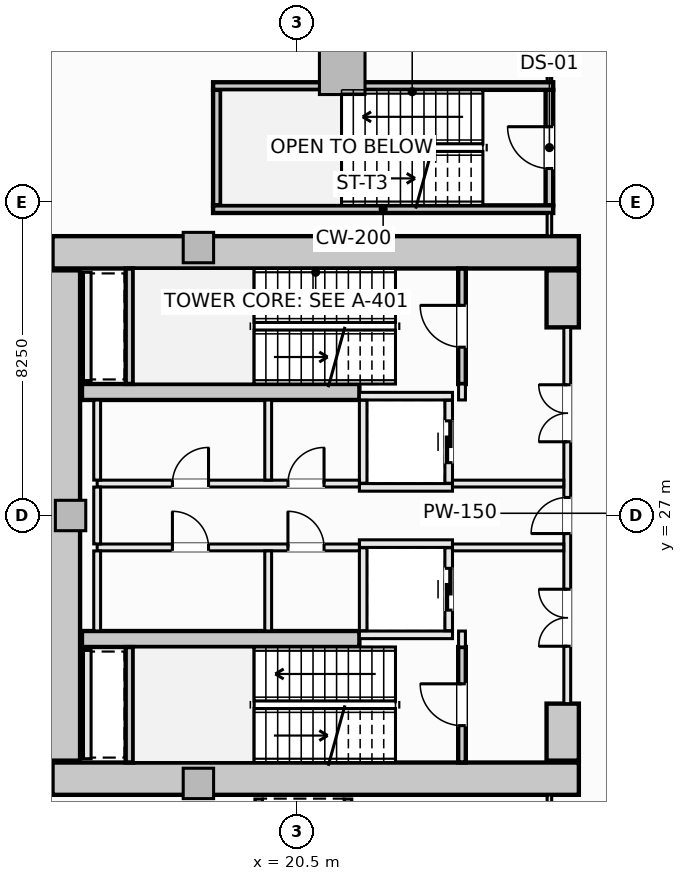
"""IFC4 building model, lengths in metres.
Left out: names, types, materials, properties, quantities, classifications, styles, units other than length and angle.
Written with IfcOpenShell. Run it as: python <this file> out.ifc"""

import sys

from ifc_helpers import new_model, si_unit, direction, frame, frame_2d, origin, origin_2d, place, context, subcontext, project, spatial, rectangle, extrude, element, fill, save


model = new_model("IFC4")
c1 = context("Model", 3, precision=1e-05, world=origin(), true_north=direction((0.0, 1.0)))
c2 = subcontext(c1, "Body", "Model", "MODEL_VIEW")
j1 = project(units=[si_unit("LENGTHUNIT", "METRE"), si_unit("PLANEANGLEUNIT", "RADIAN")], contexts=[c1])
p1 = place(None, origin())
s1 = spatial("IfcSite", under=j1, at=p1, CompositionType="ELEMENT")
p2 = place(p1, origin())
s2 = spatial("IfcBuilding", under=s1, at=p2, CompositionType="ELEMENT")
p3 = place(p2, frame((0.0, 0.0, -9.0)))
s3 = spatial("IfcBuildingStorey", under=s2, at=p3, CompositionType="ELEMENT", Elevation=-9.0)
for number, where, z_axis, x_axis in (
    (1, (14.075, 33.925, -0.32), (0.0, 0.0, 1.0), (1.0, 0.0, 0.0)),
    (2, (14.075, 20.075, -0.32), (0.0, 0.0, 1.0), (1.0, 0.0, 0.0)),
):
    element("IfcWall", number, at=place(p3, frame(where, z_axis=z_axis, x_axis=x_axis)), inside=s3, PredefinedType="SHEAR", context=c2, shape_type="SweptSolid", body=[
        extrude(rectangle(XDim=13.85, YDim=0.85, at=frame_2d((6.925, 0.0))), origin(), (0.0, 0.0, 1.0), 4.5),
    ])
p4 = place(p3, frame((14.375, 20.55, -0.32), z_axis=(0.0, 0.0, 1.0), x_axis=(0.0, 1.0, 0.0)))
e3 = element("IfcWall", 3, at=p4, inside=s3, PredefinedType="SHEAR", context=c2, shape_type="SweptSolid", body=[
    extrude(rectangle(XDim=12.9, YDim=0.85, at=frame_2d((6.45, 0.0))), origin(), (0.0, 0.0, 1.0), 4.5),
])
for number, where, z_axis, x_axis in (
    (4, (27.5, 31.95, -0.32), (0.0, 0.0, 1.0), (0.0, 1.0, 0.0)),
    (5, (27.5, 20.55, -0.32), (0.0, 0.0, 1.0), (0.0, 1.0, 0.0)),
):
    element("IfcWall", number, at=place(p3, frame(where, z_axis=z_axis, x_axis=x_axis)), inside=s3, PredefinedType="SHEAR", context=c2, shape_type="SweptSolid", body=[
        extrude(rectangle(XDim=1.5, YDim=0.85, at=frame_2d((0.75, 0.0))), origin(), (0.0, 0.0, 1.0), 4.5),
    ])
for number, where, z_axis, x_axis in (
    (6, (14.85, 30.25, -0.32), (0.0, 0.0, 1.0), (1.0, 0.0, 0.0)),
    (7, (14.85, 23.75, -0.32), (0.0, 0.0, 1.0), (1.0, 0.0, 0.0)),
):
    element("IfcWall", number, at=place(p3, frame(where, z_axis=z_axis, x_axis=x_axis)), inside=s3, PredefinedType="SHEAR", context=c2, shape_type="SweptSolid", body=[
        extrude(rectangle(XDim=7.3, YDim=0.42, at=frame_2d((3.65, 0.0))), origin(), (0.0, 0.0, 1.0), 4.5),
    ])
p5 = place(p3, frame((21.698, 38.677, -0.32), z_axis=(0.0, 0.0, 1.0), x_axis=(1.0, 0.0, 0.0)))
e8 = element("IfcColumn", 8, at=p5, inside=s3, PredefinedType="COLUMN", context=c2, shape_type="SweptSolid", body=[
    extrude(rectangle(XDim=1.2, YDim=1.2, at=origin_2d()), origin(), (0.0, 0.0, 1.0), 4.5),
])
for number, where, z_axis, x_axis in (
    (9, (17.914, 34.05, -0.32), (0.0, 0.0, 1.0), (1.0, 0.0, 0.0)),
    (10, (14.55, 27.0, -0.32), (0.0, 0.0, 1.0), (1.0, 0.0, 0.0)),
    (11, (17.914, 19.95, -0.32), (0.0, 0.0, 1.0), (1.0, 0.0, 0.0)),
):
    element("IfcColumn", number, at=place(p3, frame(where, z_axis=z_axis, x_axis=x_axis)), inside=s3, PredefinedType="PILASTER", context=c2, shape_type="SweptSolid", body=[
        extrude(rectangle(XDim=0.8, YDim=0.8, at=origin_2d()), origin(), (0.0, 0.0, 1.0), 4.5),
    ])
p6 = place(p3, frame((24.85, 30.46, -0.32), z_axis=(0.0, 0.0, 1.0), x_axis=(0.0, 1.0, 0.0)))
e12 = element("IfcWall", 12, at=p6, inside=s3, PredefinedType="SHEAR", context=c2, shape_type="SweptSolid", body=[
    extrude(rectangle(XDim=3.038, YDim=0.2, at=frame_2d((1.519, 0.0))), origin(), (0.0, 0.0, 1.0), 4.5),
])
p7 = place(p6, frame((0.969, 0.0, 0.32)))
e13 = element("IfcOpeningElement", 13, at=p7, cuts=e12, PredefinedType="OPENING", context=c2, shape_type="SweptSolid", body=[
    extrude(rectangle(XDim=1.1, YDim=2.15, at=frame_2d((0.55, 1.075))), frame((0.0, 0.11, 0.0), z_axis=(0.0, -1.0, 0.0), x_axis=(1.0, 0.0, 0.0)), (0.0, 0.0, 1.0), 0.22),
])
p8 = place(p3, frame((16.1, 30.462, -0.32), z_axis=(0.0, 0.0, 1.0), x_axis=(0.0, 1.0, 0.0)))
e14 = element("IfcWall", 14, at=p8, inside=s3, PredefinedType="SHEAR", context=c2, shape_type="SweptSolid", body=[
    extrude(rectangle(XDim=3.036, YDim=0.2, at=frame_2d((1.518, 0.0))), origin(), (0.0, 0.0, 1.0), 4.5),
])
p9 = place(p3, frame((24.85, 20.502, -0.32), z_axis=(0.0, 0.0, 1.0), x_axis=(0.0, 1.0, 0.0)))
e15 = element("IfcWall", 15, at=p9, inside=s3, PredefinedType="SHEAR", context=c2, shape_type="SweptSolid", body=[
    extrude(rectangle(XDim=3.038, YDim=0.2, at=frame_2d((1.519, 0.0))), origin(), (0.0, 0.0, 1.0), 4.5),
])
p10 = place(p9, frame((0.969, 0.0, 0.32)))
e16 = element("IfcOpeningElement", 16, at=p10, cuts=e15, PredefinedType="OPENING", context=c2, shape_type="SweptSolid", body=[
    extrude(rectangle(XDim=1.1, YDim=2.15, at=frame_2d((0.55, 1.075))), frame((0.0, 0.11, 0.0), z_axis=(0.0, -1.0, 0.0), x_axis=(1.0, 0.0, 0.0)), (0.0, 0.0, 1.0), 0.22),
])
p11 = place(p3, frame((16.1, 20.502, -0.32), z_axis=(0.0, 0.0, 1.0), x_axis=(0.0, 1.0, 0.0)))
e17 = element("IfcWall", 17, at=p11, inside=s3, PredefinedType="SHEAR", context=c2, shape_type="SweptSolid", body=[
    extrude(rectangle(XDim=3.036, YDim=0.2, at=frame_2d((1.518, 0.0))), origin(), (0.0, 0.0, 1.0), 4.5),
])
p12 = place(p3, frame((27.15, 35.16, -0.32), z_axis=(0.0, 0.0, 1.0), x_axis=(0.0, 1.0, 0.0)))
e18 = element("IfcWall", 18, at=p12, inside=s3, PredefinedType="SHEAR", context=c2, shape_type="SweptSolid", body=[
    extrude(rectangle(XDim=3.04, YDim=0.2, at=frame_2d((1.52, 0.0))), origin(), (0.0, 0.0, 1.0), 4.5),
])
p13 = place(p12, frame((0.97, 0.0, 0.32)))
e19 = element("IfcOpeningElement", 19, at=p13, cuts=e18, PredefinedType="OPENING", context=c2, shape_type="SweptSolid", body=[
    extrude(rectangle(XDim=1.1, YDim=2.15, at=frame_2d((0.55, 1.075))), frame((0.0, 0.11, 0.0), z_axis=(0.0, -1.0, 0.0), x_axis=(1.0, 0.0, 0.0)), (0.0, 0.0, 1.0), 0.22),
])
p14 = place(p3, frame((18.4, 35.16, -0.32), z_axis=(0.0, 0.0, 1.0), x_axis=(0.0, 1.0, 0.0)))
e20 = element("IfcWall", 20, at=p14, inside=s3, PredefinedType="SHEAR", context=c2, shape_type="SweptSolid", body=[
    extrude(rectangle(XDim=3.04, YDim=0.2, at=frame_2d((1.52, 0.0))), origin(), (0.0, 0.0, 1.0), 4.5),
])
for number, where, z_axis, x_axis in (
    (21, (18.3, 38.3, -0.32), (0.0, 0.0, 1.0), (1.0, 0.0, 0.0)),
    (22, (18.3, 35.06, -0.32), (0.0, 0.0, 1.0), (1.0, 0.0, 0.0)),
):
    element("IfcWall", number, at=place(p3, frame(where, z_axis=z_axis, x_axis=x_axis)), inside=s3, PredefinedType="SHEAR", context=c2, shape_type="SweptSolid", body=[
        extrude(rectangle(XDim=8.95, YDim=0.2, at=frame_2d((4.475, 0.0))), origin(), (0.0, 0.0, 1.0), 4.5),
    ])
for number, where, z_axis, x_axis in (
    (23, (22.15, 30.14, 0.0), (0.0, 0.0, 1.0), (1.0, 0.0, 0.0)),
    (24, (22.15, 27.74, 0.0), (0.0, 0.0, 1.0), (1.0, 0.0, 0.0)),
):
    element("IfcWall", number, at=place(p3, frame(where, z_axis=z_axis, x_axis=x_axis)), inside=s3, PredefinedType="SOLIDWALL", context=c2, shape_type="SweptSolid", body=[
        extrude(rectangle(XDim=2.45, YDim=0.2, at=frame_2d((1.225, 0.0))), origin(), (0.0, 0.0, 1.0), 4.18),
    ])
p15 = place(p3, frame((22.25, 27.85, 0.0), z_axis=(0.0, 0.0, 1.0), x_axis=(0.0, 1.0, 0.0)))
e25 = element("IfcWall", 25, at=p15, inside=s3, PredefinedType="SOLIDWALL", context=c2, shape_type="SweptSolid", body=[
    extrude(rectangle(XDim=2.18, YDim=0.2, at=frame_2d((1.09, 0.0))), origin(), (0.0, 0.0, 1.0), 4.18),
])
p16 = place(p3, frame((24.5, 27.85, 0.0), z_axis=(0.0, 0.0, 1.0), x_axis=(0.0, 1.0, 0.0)))
e26 = element("IfcWall", 26, at=p16, inside=s3, PredefinedType="SOLIDWALL", context=c2, shape_type="SweptSolid", body=[
    extrude(rectangle(XDim=2.18, YDim=0.2, at=frame_2d((1.09, 0.0))), origin(), (0.0, 0.0, 1.0), 4.18),
])
p17 = place(p16, frame((0.54, 0.0, 0.0)))
e27 = element("IfcOpeningElement", 27, at=p17, cuts=e26, PredefinedType="OPENING", context=c2, shape_type="SweptSolid", body=[
    extrude(rectangle(XDim=1.1, YDim=2.2, at=frame_2d((0.55, 1.1))), frame((0.0, 0.11, 0.0), z_axis=(0.0, -1.0, 0.0), x_axis=(1.0, 0.0, 0.0)), (0.0, 0.0, 1.0), 0.22),
])
for number, where, z_axis, x_axis in (
    (28, (22.15, 26.26, 0.0), (0.0, 0.0, 1.0), (1.0, 0.0, 0.0)),
    (29, (22.15, 23.86, 0.0), (0.0, 0.0, 1.0), (1.0, 0.0, 0.0)),
):
    element("IfcWall", number, at=place(p3, frame(where, z_axis=z_axis, x_axis=x_axis)), inside=s3, PredefinedType="SOLIDWALL", context=c2, shape_type="SweptSolid", body=[
        extrude(rectangle(XDim=2.45, YDim=0.2, at=frame_2d((1.225, 0.0))), origin(), (0.0, 0.0, 1.0), 4.18),
    ])
p18 = place(p3, frame((22.25, 23.97, 0.0), z_axis=(0.0, 0.0, 1.0), x_axis=(0.0, 1.0, 0.0)))
e30 = element("IfcWall", 30, at=p18, inside=s3, PredefinedType="SOLIDWALL", context=c2, shape_type="SweptSolid", body=[
    extrude(rectangle(XDim=2.18, YDim=0.2, at=frame_2d((1.09, 0.0))), origin(), (0.0, 0.0, 1.0), 4.18),
])
p19 = place(p3, frame((24.5, 23.97, 0.0), z_axis=(0.0, 0.0, 1.0), x_axis=(0.0, 1.0, 0.0)))
e31 = element("IfcWall", 31, at=p19, inside=s3, PredefinedType="SOLIDWALL", context=c2, shape_type="SweptSolid", body=[
    extrude(rectangle(XDim=2.18, YDim=0.2, at=frame_2d((1.09, 0.0))), origin(), (0.0, 0.0, 1.0), 4.18),
])
p20 = place(p19, frame((0.54, 0.0, 0.0)))
e32 = element("IfcOpeningElement", 32, at=p20, cuts=e31, PredefinedType="OPENING", context=c2, shape_type="SweptSolid", body=[
    extrude(rectangle(XDim=1.1, YDim=2.2, at=frame_2d((0.55, 1.1))), frame((0.0, 0.11, 0.0), z_axis=(0.0, -1.0, 0.0), x_axis=(1.0, 0.0, 0.0)), (0.0, 0.0, 1.0), 0.22),
])
for number, where, z_axis, x_axis in (
    (33, (19.5, 17.01, 0.0), (0.0, 0.0, 1.0), (0.0, 1.0, 0.0)),
    (34, (21.85, 17.01, 0.0), (0.0, 0.0, 1.0), (0.0, 1.0, 0.0)),
):
    element("IfcWall", number, at=place(p3, frame(where, z_axis=z_axis, x_axis=x_axis)), inside=s3, PredefinedType="SOLIDWALL", context=c2, shape_type="SweptSolid", body=[
        extrude(rectangle(XDim=2.53, YDim=0.2, at=frame_2d((1.265, 0.0))), origin(), (0.0, 0.0, 1.0), 4.18),
    ])
for number, where, z_axis, x_axis in (
    (35, (14.99, 30.55, 0.0), (0.0, 0.0, 1.0), (0.0, 1.0, 0.0)),
    (36, (14.99, 20.6, 0.0), (0.0, 0.0, 1.0), (0.0, 1.0, 0.0)),
):
    element("IfcWall", number, at=place(p3, frame(where, z_axis=z_axis, x_axis=x_axis)), inside=s3, PredefinedType="SOLIDWALL", context=c2, shape_type="SweptSolid", body=[
        extrude(rectangle(XDim=2.85, YDim=0.2, at=frame_2d((1.425, 0.0))), origin(), (0.0, 0.0, 1.0), 4.18),
    ])
for number, where, z_axis, x_axis in (
    (37, (24.85, 23.54, 0.0), (0.0, 0.0, 1.0), (0.0, 1.0, 0.0)),
    (38, (24.85, 30.04, 0.0), (0.0, 0.0, 1.0), (0.0, 1.0, 0.0)),
):
    element("IfcWall", number, at=place(p3, frame(where, z_axis=z_axis, x_axis=x_axis)), inside=s3, PredefinedType="SOLIDWALL", context=c2, shape_type="SweptSolid", body=[
        extrude(rectangle(XDim=0.42, YDim=0.18, at=frame_2d((0.21, 0.0))), origin(), (0.0, 0.0, 1.0), 4.18),
    ])
p21 = place(p3, frame((27.62, 22.05, 0.0), z_axis=(0.0, 0.0, 1.0), x_axis=(0.0, 1.0, 0.0)))
e39 = element("IfcWall", 39, at=p21, inside=s3, PredefinedType="SOLIDWALL", context=c2, shape_type="SweptSolid", body=[
    extrude(rectangle(XDim=9.9, YDim=0.18, at=frame_2d((4.95, 0.0))), origin(), (0.0, 0.0, 1.0), 3.272),
])
p22 = place(p21, frame((4.475, 0.0, 0.0)))
e40 = element("IfcOpeningElement", 40, at=p22, cuts=e39, PredefinedType="OPENING", context=c2, shape_type="SweptSolid", body=[
    extrude(rectangle(XDim=0.95, YDim=2.1, at=frame_2d((0.475, 1.05))), frame((0.0, 0.1, 0.0), z_axis=(0.0, -1.0, 0.0), x_axis=(1.0, 0.0, 0.0)), (0.0, 0.0, 1.0), 0.2),
])
p23 = place(p21, frame((6.89, 0.0, 0.0)))
e41 = element("IfcOpeningElement", 41, at=p23, cuts=e39, PredefinedType="OPENING", context=c2, shape_type="SweptSolid", body=[
    extrude(rectangle(XDim=1.5, YDim=2.2, at=frame_2d((0.75, 1.1))), frame((0.0, 0.1, 0.0), z_axis=(0.0, -1.0, 0.0), x_axis=(1.0, 0.0, 0.0)), (0.0, 0.0, 1.0), 0.2),
])
p24 = place(p21, frame((1.51, 0.0, 0.0)))
e42 = element("IfcOpeningElement", 42, at=p24, cuts=e39, PredefinedType="OPENING", context=c2, shape_type="SweptSolid", body=[
    extrude(rectangle(XDim=1.5, YDim=2.2, at=frame_2d((0.75, 1.1))), frame((0.0, 0.1, 0.0), z_axis=(0.0, -1.0, 0.0), x_axis=(1.0, 0.0, 0.0)), (0.0, 0.0, 1.0), 0.2),
])
p25 = place(p3, frame((15.25, 27.84, 0.0), z_axis=(0.0, 0.0, 1.0), x_axis=(1.0, 0.0, 0.0)))
e43 = element("IfcWall", 43, at=p25, inside=s3, PredefinedType="SOLIDWALL", context=c2, shape_type="SweptSolid", body=[
    extrude(rectangle(XDim=6.9, YDim=0.18, at=frame_2d((3.45, 0.0))), origin(), (0.0, 0.0, 1.0), 4.18),
])
p26 = place(p25, frame((5.02, 0.0, 0.0)))
e44 = element("IfcOpeningElement", 44, at=p26, cuts=e43, PredefinedType="OPENING", context=c2, shape_type="SweptSolid", body=[
    extrude(rectangle(XDim=0.95, YDim=2.1, at=frame_2d((0.475, 1.05))), frame((0.0, 0.1, 0.0), z_axis=(0.0, -1.0, 0.0), x_axis=(1.0, 0.0, 0.0)), (0.0, 0.0, 1.0), 0.2),
])
p27 = place(p25, frame((1.98, 0.0, 0.0)))
e45 = element("IfcOpeningElement", 45, at=p27, cuts=e43, PredefinedType="OPENING", context=c2, shape_type="SweptSolid", body=[
    extrude(rectangle(XDim=0.95, YDim=2.1, at=frame_2d((0.475, 1.05))), frame((0.0, 0.1, 0.0), z_axis=(0.0, -1.0, 0.0), x_axis=(1.0, 0.0, 0.0)), (0.0, 0.0, 1.0), 0.2),
])
p28 = place(p3, frame((24.6, 27.84, 0.0), z_axis=(0.0, 0.0, 1.0), x_axis=(1.0, 0.0, 0.0)))
e46 = element("IfcWall", 46, at=p28, inside=s3, PredefinedType="SOLIDWALL", context=c2, shape_type="SweptSolid", body=[
    extrude(rectangle(XDim=2.928, YDim=0.18, at=frame_2d((1.464, 0.0))), origin(), (0.0, 0.0, 1.0), 4.18),
])
p29 = place(p3, frame((15.25, 26.16, 0.0), z_axis=(0.0, 0.0, 1.0), x_axis=(1.0, 0.0, 0.0)))
e47 = element("IfcWall", 47, at=p29, inside=s3, PredefinedType="SOLIDWALL", context=c2, shape_type="SweptSolid", body=[
    extrude(rectangle(XDim=6.9, YDim=0.18, at=frame_2d((3.45, 0.0))), origin(), (0.0, 0.0, 1.0), 4.18),
])
p30 = place(p29, frame((5.02, 0.0, 0.0)))
e48 = element("IfcOpeningElement", 48, at=p30, cuts=e47, PredefinedType="OPENING", context=c2, shape_type="SweptSolid", body=[
    extrude(rectangle(XDim=0.95, YDim=2.1, at=frame_2d((0.475, 1.05))), frame((0.0, 0.1, 0.0), z_axis=(0.0, -1.0, 0.0), x_axis=(1.0, 0.0, 0.0)), (0.0, 0.0, 1.0), 0.2),
])
p31 = place(p29, frame((1.98, 0.0, 0.0)))
e49 = element("IfcOpeningElement", 49, at=p31, cuts=e47, PredefinedType="OPENING", context=c2, shape_type="SweptSolid", body=[
    extrude(rectangle(XDim=0.95, YDim=2.1, at=frame_2d((0.475, 1.05))), frame((0.0, 0.1, 0.0), z_axis=(0.0, -1.0, 0.0), x_axis=(1.0, 0.0, 0.0)), (0.0, 0.0, 1.0), 0.2),
])
p32 = place(p3, frame((24.6, 26.16, 0.0), z_axis=(0.0, 0.0, 1.0), x_axis=(1.0, 0.0, 0.0)))
e50 = element("IfcWall", 50, at=p32, inside=s3, PredefinedType="SOLIDWALL", context=c2, shape_type="SweptSolid", body=[
    extrude(rectangle(XDim=2.928, YDim=0.18, at=frame_2d((1.464, 0.0))), origin(), (0.0, 0.0, 1.0), 4.18),
])
p33 = place(p3, frame((15.25, 23.962, 0.0), z_axis=(0.0, 0.0, 1.0), x_axis=(0.0, 1.0, 0.0)))
e51 = element("IfcWall", 51, at=p33, inside=s3, PredefinedType="SOLIDWALL", context=c2, shape_type="SweptSolid", body=[
    extrude(rectangle(XDim=2.106, YDim=0.18, at=frame_2d((1.053, 0.0))), origin(), (0.0, 0.0, 1.0), 4.18),
])
p34 = place(p3, frame((15.25, 26.252, 0.0), z_axis=(0.0, 0.0, 1.0), x_axis=(0.0, 1.0, 0.0)))
e52 = element("IfcWall", 52, at=p34, inside=s3, PredefinedType="SOLIDWALL", context=c2, shape_type="SweptSolid", body=[
    extrude(rectangle(XDim=1.496, YDim=0.18, at=frame_2d((0.748, 0.0))), origin(), (0.0, 0.0, 1.0), 4.18),
])
for number, where, z_axis, x_axis in (
    (53, (15.25, 27.932, 0.0), (0.0, 0.0, 1.0), (0.0, 1.0, 0.0)),
    (54, (19.75, 23.962, 0.0), (0.0, 0.0, 1.0), (0.0, 1.0, 0.0)),
    (55, (19.75, 27.932, 0.0), (0.0, 0.0, 1.0), (0.0, 1.0, 0.0)),
):
    element("IfcWall", number, at=place(p3, frame(where, z_axis=z_axis, x_axis=x_axis)), inside=s3, PredefinedType="SOLIDWALL", context=c2, shape_type="SweptSolid", body=[
        extrude(rectangle(XDim=2.106, YDim=0.18, at=frame_2d((1.053, 0.0))), origin(), (0.0, 0.0, 1.0), 4.18),
    ])
p35 = place(p3, frame((27.15, 17.112, 0.0), z_axis=(0.0, 0.0, 1.0), x_axis=(0.0, 1.0, 0.0)))
e56 = element("IfcWall", 56, at=p35, inside=s3, PredefinedType="PARTITIONING", context=c2, shape_type="SweptSolid", body=[
    extrude(rectangle(XDim=2.536, YDim=0.12, at=frame_2d((1.268, 0.0))), origin(), (0.0, 0.0, 1.0), 4.18),
])
p36 = place(p3, frame((27.15, 34.352, 0.0), z_axis=(0.0, 0.0, 1.0), x_axis=(0.0, 1.0, 0.0)))
e57 = element("IfcWall", 57, at=p36, inside=s3, PredefinedType="PARTITIONING", context=c2, shape_type="SweptSolid", body=[
    extrude(rectangle(XDim=0.606, YDim=0.12, at=frame_2d((0.303, 0.0))), origin(), (0.0, 0.0, 1.0), 4.18),
])
p37 = place(p3, frame((27.15, 38.402, 0.0), z_axis=(0.0, 0.0, 1.0), x_axis=(0.0, 1.0, 0.0)))
e58 = element("IfcWall", 58, at=p37, inside=s3, PredefinedType="PARTITIONING", context=c2, shape_type="SweptSolid", body=[
    extrude(rectangle(XDim=12.398, YDim=0.12, at=frame_2d((6.199, 0.0))), origin(), (0.0, 0.0, 1.0), 4.18),
])
p38 = place(p37, frame((4.629, 0.0, 0.0)))
e59 = element("IfcOpeningElement", 59, at=p38, cuts=e58, PredefinedType="OPENING", context=c2, shape_type="SweptSolid", body=[
    extrude(rectangle(XDim=0.95, YDim=2.1, at=frame_2d((0.475, 1.05))), frame((0.0, 0.07, 0.0), z_axis=(0.0, -1.0, 0.0), x_axis=(1.0, 0.0, 0.0)), (0.0, 0.0, 1.0), 0.14),
])
p39 = place(p7, origin())
e60 = element("IfcDoor", 60, at=p39, inside=s3, OperationType="SINGLE_SWING_RIGHT", PredefinedType="DOOR", context=c2, shape_type="SweptSolid", body=[
    extrude(rectangle(XDim=1.1, YDim=2.15, at=frame_2d((0.55, 1.075))), frame((0.0, 0.025, 0.0), z_axis=(0.0, -1.0, 0.0), x_axis=(1.0, 0.0, 0.0)), (0.0, 0.0, 1.0), 0.05),
])
fill(e13, e60)
p40 = place(p10, origin())
e61 = element("IfcDoor", 61, at=p40, inside=s3, OperationType="SINGLE_SWING_RIGHT", PredefinedType="DOOR", context=c2, shape_type="SweptSolid", body=[
    extrude(rectangle(XDim=1.1, YDim=2.15, at=frame_2d((0.55, 1.075))), frame((0.0, 0.025, 0.0), z_axis=(0.0, -1.0, 0.0), x_axis=(1.0, 0.0, 0.0)), (0.0, 0.0, 1.0), 0.05),
])
fill(e16, e61)
p41 = place(p13, origin())
e62 = element("IfcDoor", 62, at=p41, inside=s3, OperationType="SINGLE_SWING_RIGHT", PredefinedType="DOOR", context=c2, shape_type="SweptSolid", body=[
    extrude(rectangle(XDim=1.1, YDim=2.15, at=frame_2d((0.55, 1.075))), frame((0.0, 0.025, 0.0), z_axis=(0.0, -1.0, 0.0), x_axis=(1.0, 0.0, 0.0)), (0.0, 0.0, 1.0), 0.05),
])
fill(e19, e62)
p42 = place(p17, origin())
e63 = element("IfcDoor", 63, at=p42, inside=s3, OperationType="SLIDING_TO_LEFT", PredefinedType="DOOR", context=c2, shape_type="SweptSolid", body=[
    extrude(rectangle(XDim=1.1, YDim=2.2, at=frame_2d((0.55, 1.1))), frame((0.0, 0.025, 0.0), z_axis=(0.0, -1.0, 0.0), x_axis=(1.0, 0.0, 0.0)), (0.0, 0.0, 1.0), 0.05),
])
fill(e27, e63)
p43 = place(p20, origin())
e64 = element("IfcDoor", 64, at=p43, inside=s3, OperationType="SLIDING_TO_LEFT", PredefinedType="DOOR", context=c2, shape_type="SweptSolid", body=[
    extrude(rectangle(XDim=1.1, YDim=2.2, at=frame_2d((0.55, 1.1))), frame((0.0, 0.025, 0.0), z_axis=(0.0, -1.0, 0.0), x_axis=(1.0, 0.0, 0.0)), (0.0, 0.0, 1.0), 0.05),
])
fill(e32, e64)
p44 = place(p22, origin())
e65 = element("IfcDoor", 65, at=p44, inside=s3, OperationType="SINGLE_SWING_LEFT", PredefinedType="DOOR", context=c2, shape_type="SweptSolid", body=[
    extrude(rectangle(XDim=0.95, YDim=2.1, at=frame_2d((0.475, 1.05))), frame((0.0, 0.025, 0.0), z_axis=(0.0, -1.0, 0.0), x_axis=(1.0, 0.0, 0.0)), (0.0, 0.0, 1.0), 0.05),
])
fill(e40, e65)
p45 = place(p23, origin())
e66 = element("IfcDoor", 66, at=p45, inside=s3, OperationType="DOUBLE_DOOR_SINGLE_SWING", PredefinedType="DOOR", context=c2, shape_type="SweptSolid", body=[
    extrude(rectangle(XDim=1.5, YDim=2.2, at=frame_2d((0.75, 1.1))), frame((0.0, 0.025, 0.0), z_axis=(0.0, -1.0, 0.0), x_axis=(1.0, 0.0, 0.0)), (0.0, 0.0, 1.0), 0.05),
])
fill(e41, e66)
p46 = place(p24, origin())
e67 = element("IfcDoor", 67, at=p46, inside=s3, OperationType="DOUBLE_DOOR_SINGLE_SWING", PredefinedType="DOOR", context=c2, shape_type="SweptSolid", body=[
    extrude(rectangle(XDim=1.5, YDim=2.2, at=frame_2d((0.75, 1.1))), frame((0.0, 0.025, 0.0), z_axis=(0.0, -1.0, 0.0), x_axis=(1.0, 0.0, 0.0)), (0.0, 0.0, 1.0), 0.05),
])
fill(e42, e67)
p47 = place(p26, origin())
e68 = element("IfcDoor", 68, at=p47, inside=s3, OperationType="SINGLE_SWING_RIGHT", PredefinedType="DOOR", context=c2, shape_type="SweptSolid", body=[
    extrude(rectangle(XDim=0.95, YDim=2.1, at=frame_2d((0.475, 1.05))), frame((0.0, 0.025, 0.0), z_axis=(0.0, -1.0, 0.0), x_axis=(1.0, 0.0, 0.0)), (0.0, 0.0, 1.0), 0.05),
])
fill(e44, e68)
p48 = place(p30, origin())
e69 = element("IfcDoor", 69, at=p48, inside=s3, OperationType="SINGLE_SWING_LEFT", PredefinedType="DOOR", context=c2, shape_type="SweptSolid", body=[
    extrude(rectangle(XDim=0.95, YDim=2.1, at=frame_2d((0.475, 1.05))), frame((0.0, 0.025, 0.0), z_axis=(0.0, -1.0, 0.0), x_axis=(1.0, 0.0, 0.0)), (0.0, 0.0, 1.0), 0.05),
])
fill(e48, e69)
p49 = place(p27, origin())
e70 = element("IfcDoor", 70, at=p49, inside=s3, OperationType="SINGLE_SWING_RIGHT", PredefinedType="DOOR", context=c2, shape_type="SweptSolid", body=[
    extrude(rectangle(XDim=0.95, YDim=2.1, at=frame_2d((0.475, 1.05))), frame((0.0, 0.025, 0.0), z_axis=(0.0, -1.0, 0.0), x_axis=(1.0, 0.0, 0.0)), (0.0, 0.0, 1.0), 0.05),
])
fill(e45, e70)
p50 = place(p31, origin())
e71 = element("IfcDoor", 71, at=p50, inside=s3, OperationType="SINGLE_SWING_LEFT", PredefinedType="DOOR", context=c2, shape_type="SweptSolid", body=[
    extrude(rectangle(XDim=0.95, YDim=2.1, at=frame_2d((0.475, 1.05))), frame((0.0, 0.025, 0.0), z_axis=(0.0, -1.0, 0.0), x_axis=(1.0, 0.0, 0.0)), (0.0, 0.0, 1.0), 0.05),
])
fill(e49, e71)
save(model, sys.argv[1])
